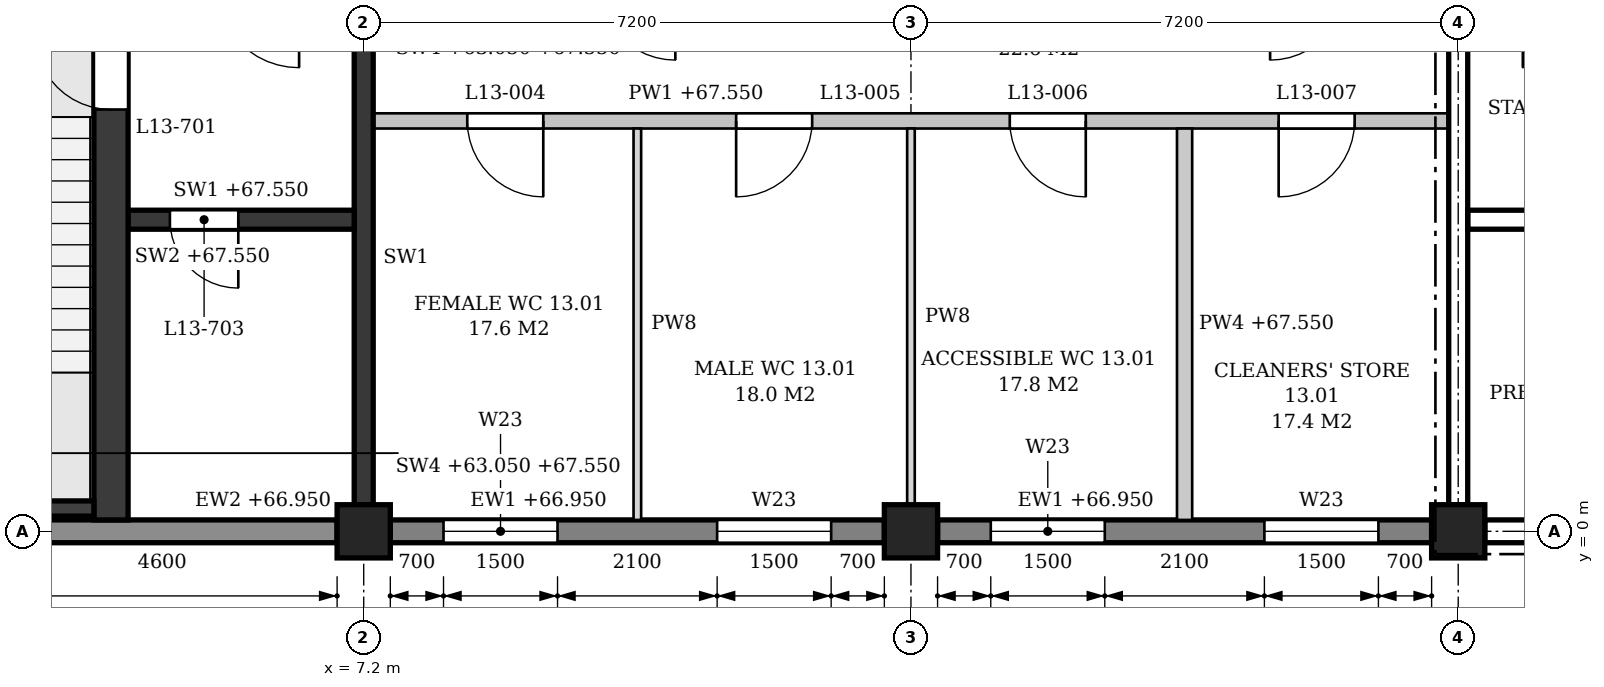
"""IFC4 building model, lengths in metres.
Left out: names, types, materials, properties, quantities, classifications, styles, units other than length and angle.
Written with IfcOpenShell. Run it as: python <this file> out.ifc"""

import sys

from ifc_helpers import new_model, si_unit, direction, frame, frame_2d, origin, origin_2d, place, context, subcontext, project, spatial, polyline, rectangle, outline, extrude, element, fill, save


model = new_model("IFC4")
c1 = context("Model", 3, precision=1e-05, world=origin(), true_north=direction((0.0, 1.0)))
c2 = subcontext(c1, "Body", "Model", "MODEL_VIEW")
j1 = project(units=[si_unit("LENGTHUNIT", "METRE"), si_unit("PLANEANGLEUNIT", "RADIAN")], contexts=[c1])
p1 = place(None, origin())
s1 = spatial("IfcSite", under=j1, at=p1, CompositionType="ELEMENT")
p2 = place(p1, origin())
s2 = spatial("IfcBuilding", under=s1, at=p2, CompositionType="ELEMENT")
p3 = place(p2, frame((0.0, 0.0, 63.3)))
s3 = spatial("IfcBuildingStorey", under=s2, at=p3, CompositionType="ELEMENT", Elevation=63.3)
for number, where, z_axis, x_axis in (
    (1, (7.2, 0.0, 0.0), (0.0, 0.0, 1.0), (1.0, 0.0, 0.0)),
    (2, (14.4, 0.0, 0.0), (0.0, 0.0, 1.0), (1.0, 0.0, 0.0)),
    (3, (21.6, 0.0, 0.0), (0.0, 0.0, 1.0), (1.0, 0.0, 0.0)),
):
    element("IfcColumn", number, at=place(p3, frame(where, z_axis=z_axis, x_axis=x_axis)), inside=s3, PredefinedType="COLUMN", context=c2, shape_type="SweptSolid", body=[
        extrude(rectangle(XDim=0.7, YDim=0.7, at=origin_2d()), origin(), (0.0, 0.0, 1.0), 4.5),
    ])
p4 = place(p3, frame((0.35, 0.0, 0.0), z_axis=(0.0, 0.0, 1.0), x_axis=(1.0, 0.0, 0.0)))
e4 = element("IfcWall", 4, at=p4, inside=s3, PredefinedType="STANDARD", context=c2, shape_type="SweptSolid", body=[
    extrude(rectangle(XDim=6.5, YDim=0.3, at=frame_2d((3.25, 0.0))), origin(), (0.0, 0.0, 1.0), 3.65),
])
p5 = place(p4, frame((1.0, 0.0, 0.9)))
e5 = element("IfcOpeningElement", 5, at=p5, cuts=e4, PredefinedType="OPENING", context=c2, shape_type="SweptSolid", body=[
    extrude(outline(polyline([(0.0, 0.0), (0.9, 0.0), (0.9, 2.25), (0.45, 2.7), (0.0, 2.25), (0.0, 0.0)])), frame((0.0, 0.16, 0.0), z_axis=(0.0, -1.0, 0.0), x_axis=(1.0, 0.0, 0.0)), (0.0, 0.0, 1.0), 0.32),
])
p6 = place(p3, frame((7.55, 0.0, 0.0), z_axis=(0.0, 0.0, 1.0), x_axis=(1.0, 0.0, 0.0)))
e6 = element("IfcWall", 6, at=p6, inside=s3, PredefinedType="STANDARD", context=c2, shape_type="SweptSolid", body=[
    extrude(rectangle(XDim=6.5, YDim=0.3, at=frame_2d((3.25, 0.0))), origin(), (0.0, 0.0, 1.0), 3.65),
])
p7 = place(p6, frame((0.7, 0.0, 0.9)))
e7 = element("IfcOpeningElement", 7, at=p7, cuts=e6, PredefinedType="OPENING", context=c2, shape_type="SweptSolid", body=[
    extrude(outline(polyline([(0.0, 0.0), (1.5, 0.0), (1.5, 1.95), (0.75, 2.7), (0.0, 1.95), (0.0, 0.0)])), frame((0.0, 0.16, 0.0), z_axis=(0.0, -1.0, 0.0), x_axis=(1.0, 0.0, 0.0)), (0.0, 0.0, 1.0), 0.32),
])
p8 = place(p6, frame((4.3, 0.0, 0.9)))
e8 = element("IfcOpeningElement", 8, at=p8, cuts=e6, PredefinedType="OPENING", context=c2, shape_type="SweptSolid", body=[
    extrude(outline(polyline([(0.0, 0.0), (1.5, 0.0), (1.5, 1.95), (0.75, 2.7), (0.0, 1.95), (0.0, 0.0)])), frame((0.0, 0.16, 0.0), z_axis=(0.0, -1.0, 0.0), x_axis=(1.0, 0.0, 0.0)), (0.0, 0.0, 1.0), 0.32),
])
p9 = place(p3, frame((14.75, 0.0, 0.0), z_axis=(0.0, 0.0, 1.0), x_axis=(1.0, 0.0, 0.0)))
e9 = element("IfcWall", 9, at=p9, inside=s3, PredefinedType="STANDARD", context=c2, shape_type="SweptSolid", body=[
    extrude(rectangle(XDim=6.5, YDim=0.3, at=frame_2d((3.25, 0.0))), origin(), (0.0, 0.0, 1.0), 3.65),
])
p10 = place(p9, frame((0.7, 0.0, 0.9)))
e10 = element("IfcOpeningElement", 10, at=p10, cuts=e9, PredefinedType="OPENING", context=c2, shape_type="SweptSolid", body=[
    extrude(outline(polyline([(0.0, 0.0), (1.5, 0.0), (1.5, 1.95), (0.75, 2.7), (0.0, 1.95), (0.0, 0.0)])), frame((0.0, 0.16, 0.0), z_axis=(0.0, -1.0, 0.0), x_axis=(1.0, 0.0, 0.0)), (0.0, 0.0, 1.0), 0.32),
])
p11 = place(p9, frame((4.3, 0.0, 0.9)))
e11 = element("IfcOpeningElement", 11, at=p11, cuts=e9, PredefinedType="OPENING", context=c2, shape_type="SweptSolid", body=[
    extrude(outline(polyline([(0.0, 0.0), (1.5, 0.0), (1.5, 1.95), (0.75, 2.7), (0.0, 1.95), (0.0, 0.0)])), frame((0.0, 0.16, 0.0), z_axis=(0.0, -1.0, 0.0), x_axis=(1.0, 0.0, 0.0)), (0.0, 0.0, 1.0), 0.32),
])
p12 = place(p3, frame((21.95, 0.0, 0.0), z_axis=(0.0, 0.0, 1.0), x_axis=(1.0, 0.0, 0.0)))
e12 = element("IfcWall", 12, at=p12, inside=s3, PredefinedType="STANDARD", context=c2, shape_type="SweptSolid", body=[
    extrude(rectangle(XDim=6.5, YDim=0.3, at=frame_2d((3.25, 0.0))), origin(), (0.0, 0.0, 1.0), 3.65),
])
p13 = place(p12, frame((4.6, 0.0, 0.9)))
e13 = element("IfcOpeningElement", 13, at=p13, cuts=e12, PredefinedType="OPENING", context=c2, shape_type="SweptSolid", body=[
    extrude(outline(polyline([(0.0, 0.0), (0.9, 0.0), (0.9, 2.25), (0.45, 2.7), (0.0, 2.25), (0.0, 0.0)])), frame((0.0, 0.16, 0.0), z_axis=(0.0, -1.0, 0.0), x_axis=(1.0, 0.0, 0.0)), (0.0, 0.0, 1.0), 0.32),
])
p14 = place(p3, frame((7.2, 0.35, 0.0), z_axis=(0.0, 0.0, 1.0), x_axis=(0.0, 1.0, 0.0)))
e14 = element("IfcWall", 14, at=p14, inside=s3, PredefinedType="SHEAR", context=c2, shape_type="SweptSolid", body=[
    extrude(rectangle(XDim=6.5, YDim=0.25, at=frame_2d((3.25, 0.0))), origin(), (0.0, 0.0, 1.0), 3.6),
])
p15 = place(p3, frame((2.25, 0.3, -0.25), z_axis=(0.0, 0.0, 1.0), x_axis=(1.0, 0.0, 0.0)))
e15 = element("IfcWall", 15, at=p15, inside=s3, PredefinedType="SHEAR", context=c2, shape_type="SweptSolid", body=[
    extrude(rectangle(XDim=1.4, YDim=0.2, at=frame_2d((0.7, 0.0))), origin(), (0.0, 0.0, 1.0), 4.5),
])
p16 = place(p3, frame((3.875, 0.15, 0.0), z_axis=(0.0, 0.0, 1.0), x_axis=(0.0, 1.0, 0.0)))
e16 = element("IfcWall", 16, at=p16, inside=s3, PredefinedType="SHEAR", context=c2, shape_type="SweptSolid", body=[
    extrude(rectangle(XDim=6.925, YDim=0.45, at=frame_2d((3.462, 0.0))), origin(), (0.0, 0.0, 1.0), 4.25),
])
p17 = place(p16, frame((5.4, 0.0, 0.0)))
e17 = element("IfcOpeningElement", 17, at=p17, cuts=e16, PredefinedType="OPENING", context=c2, shape_type="SweptSolid", body=[
    extrude(rectangle(XDim=1.0, YDim=2.1, at=frame_2d((0.5, 1.05))), frame((0.0, 0.235, 0.0), z_axis=(0.0, -1.0, 0.0), x_axis=(1.0, 0.0, 0.0)), (0.0, 0.0, 1.0), 0.47),
])
p18 = place(p3, frame((4.1, 4.1, 0.0), z_axis=(0.0, 0.0, 1.0), x_axis=(1.0, 0.0, 0.0)))
e18 = element("IfcWall", 18, at=p18, inside=s3, PredefinedType="SHEAR", context=c2, shape_type="SweptSolid", body=[
    extrude(rectangle(XDim=2.975, YDim=0.25, at=frame_2d((1.487, 0.0))), origin(), (0.0, 0.0, 1.0), 4.25),
])
p19 = place(p18, frame((0.55, 0.0, 0.0)))
e19 = element("IfcOpeningElement", 19, at=p19, cuts=e18, PredefinedType="OPENING", context=c2, shape_type="SweptSolid", body=[
    extrude(rectangle(XDim=0.9, YDim=2.1, at=frame_2d((0.45, 1.05))), frame((0.0, 0.135, 0.0), z_axis=(0.0, -1.0, 0.0), x_axis=(1.0, 0.0, 0.0)), (0.0, 0.0, 1.0), 0.27),
])
p20 = place(p3, frame((21.6, 0.35, 0.0), z_axis=(0.0, 0.0, 1.0), x_axis=(0.0, 1.0, 0.0)))
e20 = element("IfcWall", 20, at=p20, inside=s3, PredefinedType="SHEAR", context=c2, shape_type="SweptSolid", body=[
    extrude(rectangle(XDim=6.5, YDim=0.25, at=frame_2d((3.25, 0.0))), origin(), (0.0, 0.0, 1.0), 3.6),
])
p21 = place(p3, frame((21.725, 4.1, 0.0), z_axis=(0.0, 0.0, 1.0), x_axis=(1.0, 0.0, 0.0)))
e21 = element("IfcWall", 21, at=p21, inside=s3, PredefinedType="SHEAR", context=c2, shape_type="SweptSolid", body=[
    extrude(rectangle(XDim=2.975, YDim=0.25, at=frame_2d((1.487, 0.0))), origin(), (0.0, 0.0, 1.0), 4.25),
])
p22 = place(p21, frame((1.525, 0.0, 0.0)))
e22 = element("IfcOpeningElement", 22, at=p22, cuts=e21, PredefinedType="OPENING", context=c2, shape_type="SweptSolid", body=[
    extrude(rectangle(XDim=0.9, YDim=2.1, at=frame_2d((0.45, 1.05))), frame((0.0, 0.135, 0.0), z_axis=(0.0, -1.0, 0.0), x_axis=(1.0, 0.0, 0.0)), (0.0, 0.0, 1.0), 0.27),
])
p23 = place(p3, frame((7.325, 5.4, 0.0), z_axis=(0.0, 0.0, 1.0), x_axis=(1.0, 0.0, 0.0)))
e23 = element("IfcWall", 23, at=p23, inside=s3, PredefinedType="PARTITIONING", context=c2, shape_type="SweptSolid", body=[
    extrude(outline(polyline([(0.0, 0.0), (14.15, 0.0), (14.15, 3.6), (14.075, 3.6), (14.075, 4.25), (7.275, 4.25), (7.275, 3.6), (6.875, 3.6), (6.875, 4.25), (0.075, 4.25), (0.075, 3.6), (0.0, 3.6), (0.0, 0.0)])), frame((0.0, 0.1, 0.0), z_axis=(0.0, -1.0, 0.0), x_axis=(1.0, 0.0, 0.0)), (0.0, 0.0, 1.0), 0.2),
])
p24 = place(p23, frame((1.238, 0.0, 0.0)))
e24 = element("IfcOpeningElement", 24, at=p24, cuts=e23, PredefinedType="OPENING", context=c2, shape_type="SweptSolid", body=[
    extrude(rectangle(XDim=1.0, YDim=2.1, at=frame_2d((0.5, 1.05))), frame((0.0, 0.11, 0.0), z_axis=(0.0, -1.0, 0.0), x_axis=(1.0, 0.0, 0.0)), (0.0, 0.0, 1.0), 0.22),
])
p25 = place(p23, frame((4.775, 0.0, 0.0)))
e25 = element("IfcOpeningElement", 25, at=p25, cuts=e23, PredefinedType="OPENING", context=c2, shape_type="SweptSolid", body=[
    extrude(rectangle(XDim=1.0, YDim=2.1, at=frame_2d((0.5, 1.05))), frame((0.0, 0.11, 0.0), z_axis=(0.0, -1.0, 0.0), x_axis=(1.0, 0.0, 0.0)), (0.0, 0.0, 1.0), 0.22),
])
p26 = place(p23, frame((8.375, 0.0, 0.0)))
e26 = element("IfcOpeningElement", 26, at=p26, cuts=e23, PredefinedType="OPENING", context=c2, shape_type="SweptSolid", body=[
    extrude(rectangle(XDim=1.0, YDim=2.1, at=frame_2d((0.5, 1.05))), frame((0.0, 0.11, 0.0), z_axis=(0.0, -1.0, 0.0), x_axis=(1.0, 0.0, 0.0)), (0.0, 0.0, 1.0), 0.22),
])
p27 = place(p23, frame((11.913, 0.0, 0.0)))
e27 = element("IfcOpeningElement", 27, at=p27, cuts=e23, PredefinedType="OPENING", context=c2, shape_type="SweptSolid", body=[
    extrude(rectangle(XDim=1.0, YDim=2.1, at=frame_2d((0.5, 1.05))), frame((0.0, 0.11, 0.0), z_axis=(0.0, -1.0, 0.0), x_axis=(1.0, 0.0, 0.0)), (0.0, 0.0, 1.0), 0.22),
])
p28 = place(p3, frame((10.8, 0.15, 0.0), z_axis=(0.0, 0.0, 1.0), x_axis=(0.0, 1.0, 0.0)))
e28 = element("IfcWall", 28, at=p28, inside=s3, PredefinedType="PARTITIONING", context=c2, shape_type="SweptSolid", body=[
    extrude(rectangle(XDim=5.15, YDim=0.1, at=frame_2d((2.575, 0.0))), origin(), (0.0, 0.0, 1.0), 3.6),
])
p29 = place(p3, frame((14.4, 0.35, 0.0), z_axis=(0.0, 0.0, 1.0), x_axis=(0.0, 1.0, 0.0)))
e29 = element("IfcWall", 29, at=p29, inside=s3, PredefinedType="PARTITIONING", context=c2, shape_type="SweptSolid", body=[
    extrude(rectangle(XDim=4.95, YDim=0.1, at=frame_2d((2.475, 0.0))), origin(), (0.0, 0.0, 1.0), 3.6),
])
p30 = place(p3, frame((18.0, 0.15, 0.0), z_axis=(0.0, 0.0, 1.0), x_axis=(0.0, 1.0, 0.0)))
e30 = element("IfcWall", 30, at=p30, inside=s3, PredefinedType="PARTITIONING", context=c2, shape_type="SweptSolid", body=[
    extrude(outline(polyline([(0.0, 0.0), (5.15, 0.0), (5.15, 4.25), (0.05, 4.25), (0.05, 3.65), (0.0, 3.65), (0.0, 0.0)])), frame((0.0, 0.1, 0.0), z_axis=(0.0, -1.0, 0.0), x_axis=(1.0, 0.0, 0.0)), (0.0, 0.0, 1.0), 0.2),
])
p31 = place(p7, origin())
e31 = element("IfcWindow", 31, at=p31, inside=s3, PartitioningType="SINGLE_PANEL", PredefinedType="WINDOW", context=c2, shape_type="SweptSolid", body=[
    extrude(outline(polyline([(0.0, 0.0), (1.5, 0.0), (1.5, 1.95), (0.75, 2.7), (0.0, 1.95), (0.0, 0.0)])), frame((0.0, 0.03, 0.0), z_axis=(0.0, -1.0, 0.0), x_axis=(1.0, 0.0, 0.0)), (0.0, 0.0, 1.0), 0.06),
])
fill(e7, e31)
p32 = place(p8, origin())
e32 = element("IfcWindow", 32, at=p32, inside=s3, PartitioningType="SINGLE_PANEL", PredefinedType="WINDOW", context=c2, shape_type="SweptSolid", body=[
    extrude(outline(polyline([(0.0, 0.0), (1.5, 0.0), (1.5, 1.95), (0.75, 2.7), (0.0, 1.95), (0.0, 0.0)])), frame((0.0, 0.03, 0.0), z_axis=(0.0, -1.0, 0.0), x_axis=(1.0, 0.0, 0.0)), (0.0, 0.0, 1.0), 0.06),
])
fill(e8, e32)
p33 = place(p10, origin())
e33 = element("IfcWindow", 33, at=p33, inside=s3, PartitioningType="SINGLE_PANEL", PredefinedType="WINDOW", context=c2, shape_type="SweptSolid", body=[
    extrude(outline(polyline([(0.0, 0.0), (1.5, 0.0), (1.5, 1.95), (0.75, 2.7), (0.0, 1.95), (0.0, 0.0)])), frame((0.0, 0.03, 0.0), z_axis=(0.0, -1.0, 0.0), x_axis=(1.0, 0.0, 0.0)), (0.0, 0.0, 1.0), 0.06),
])
fill(e10, e33)
p34 = place(p11, origin())
e34 = element("IfcWindow", 34, at=p34, inside=s3, PartitioningType="SINGLE_PANEL", PredefinedType="WINDOW", context=c2, shape_type="SweptSolid", body=[
    extrude(outline(polyline([(0.0, 0.0), (1.5, 0.0), (1.5, 1.95), (0.75, 2.7), (0.0, 1.95), (0.0, 0.0)])), frame((0.0, 0.03, 0.0), z_axis=(0.0, -1.0, 0.0), x_axis=(1.0, 0.0, 0.0)), (0.0, 0.0, 1.0), 0.06),
])
fill(e11, e34)
p35 = place(p17, origin())
e35 = element("IfcDoor", 35, at=p35, inside=s3, OperationType="SINGLE_SWING_RIGHT", PredefinedType="DOOR", context=c2, shape_type="SweptSolid", body=[
    extrude(rectangle(XDim=1.0, YDim=2.1, at=frame_2d((0.5, 1.05))), frame((0.0, 0.025, 0.0), z_axis=(0.0, -1.0, 0.0), x_axis=(1.0, 0.0, 0.0)), (0.0, 0.0, 1.0), 0.05),
])
fill(e17, e35)
p36 = place(p19, frame((0.9, 0.0, 0.0), z_axis=(0.0, 0.0, 1.0), x_axis=(-1.0, 0.0, 0.0)))
e36 = element("IfcDoor", 36, at=p36, inside=s3, OperationType="SINGLE_SWING_LEFT", PredefinedType="DOOR", context=c2, shape_type="SweptSolid", body=[
    extrude(rectangle(XDim=0.9, YDim=2.1, at=frame_2d((0.45, 1.05))), frame((0.0, 0.025, 0.0), z_axis=(0.0, -1.0, 0.0), x_axis=(1.0, 0.0, 0.0)), (0.0, 0.0, 1.0), 0.05),
])
fill(e19, e36)
p37 = place(p24, frame((1.0, 0.0, 0.0), z_axis=(0.0, 0.0, 1.0), x_axis=(-1.0, 0.0, 0.0)))
e37 = element("IfcDoor", 37, at=p37, inside=s3, OperationType="SINGLE_SWING_LEFT", PredefinedType="DOOR", context=c2, shape_type="SweptSolid", body=[
    extrude(rectangle(XDim=1.0, YDim=2.1, at=frame_2d((0.5, 1.05))), frame((0.0, 0.025, 0.0), z_axis=(0.0, -1.0, 0.0), x_axis=(1.0, 0.0, 0.0)), (0.0, 0.0, 1.0), 0.05),
])
fill(e24, e37)
p38 = place(p25, frame((1.0, 0.0, 0.0), z_axis=(0.0, 0.0, 1.0), x_axis=(-1.0, 0.0, 0.0)))
e38 = element("IfcDoor", 38, at=p38, inside=s3, OperationType="SINGLE_SWING_RIGHT", PredefinedType="DOOR", context=c2, shape_type="SweptSolid", body=[
    extrude(rectangle(XDim=1.0, YDim=2.1, at=frame_2d((0.5, 1.05))), frame((0.0, 0.025, 0.0), z_axis=(0.0, -1.0, 0.0), x_axis=(1.0, 0.0, 0.0)), (0.0, 0.0, 1.0), 0.05),
])
fill(e25, e38)
p39 = place(p26, frame((1.0, 0.0, 0.0), z_axis=(0.0, 0.0, 1.0), x_axis=(-1.0, 0.0, 0.0)))
e39 = element("IfcDoor", 39, at=p39, inside=s3, OperationType="SINGLE_SWING_LEFT", PredefinedType="DOOR", context=c2, shape_type="SweptSolid", body=[
    extrude(rectangle(XDim=1.0, YDim=2.1, at=frame_2d((0.5, 1.05))), frame((0.0, 0.025, 0.0), z_axis=(0.0, -1.0, 0.0), x_axis=(1.0, 0.0, 0.0)), (0.0, 0.0, 1.0), 0.05),
])
fill(e26, e39)
p40 = place(p27, frame((1.0, 0.0, 0.0), z_axis=(0.0, 0.0, 1.0), x_axis=(-1.0, 0.0, 0.0)))
e40 = element("IfcDoor", 40, at=p40, inside=s3, OperationType="SINGLE_SWING_RIGHT", PredefinedType="DOOR", context=c2, shape_type="SweptSolid", body=[
    extrude(rectangle(XDim=1.0, YDim=2.1, at=frame_2d((0.5, 1.05))), frame((0.0, 0.025, 0.0), z_axis=(0.0, -1.0, 0.0), x_axis=(1.0, 0.0, 0.0)), (0.0, 0.0, 1.0), 0.05),
])
fill(e27, e40)
save(model, sys.argv[1])
